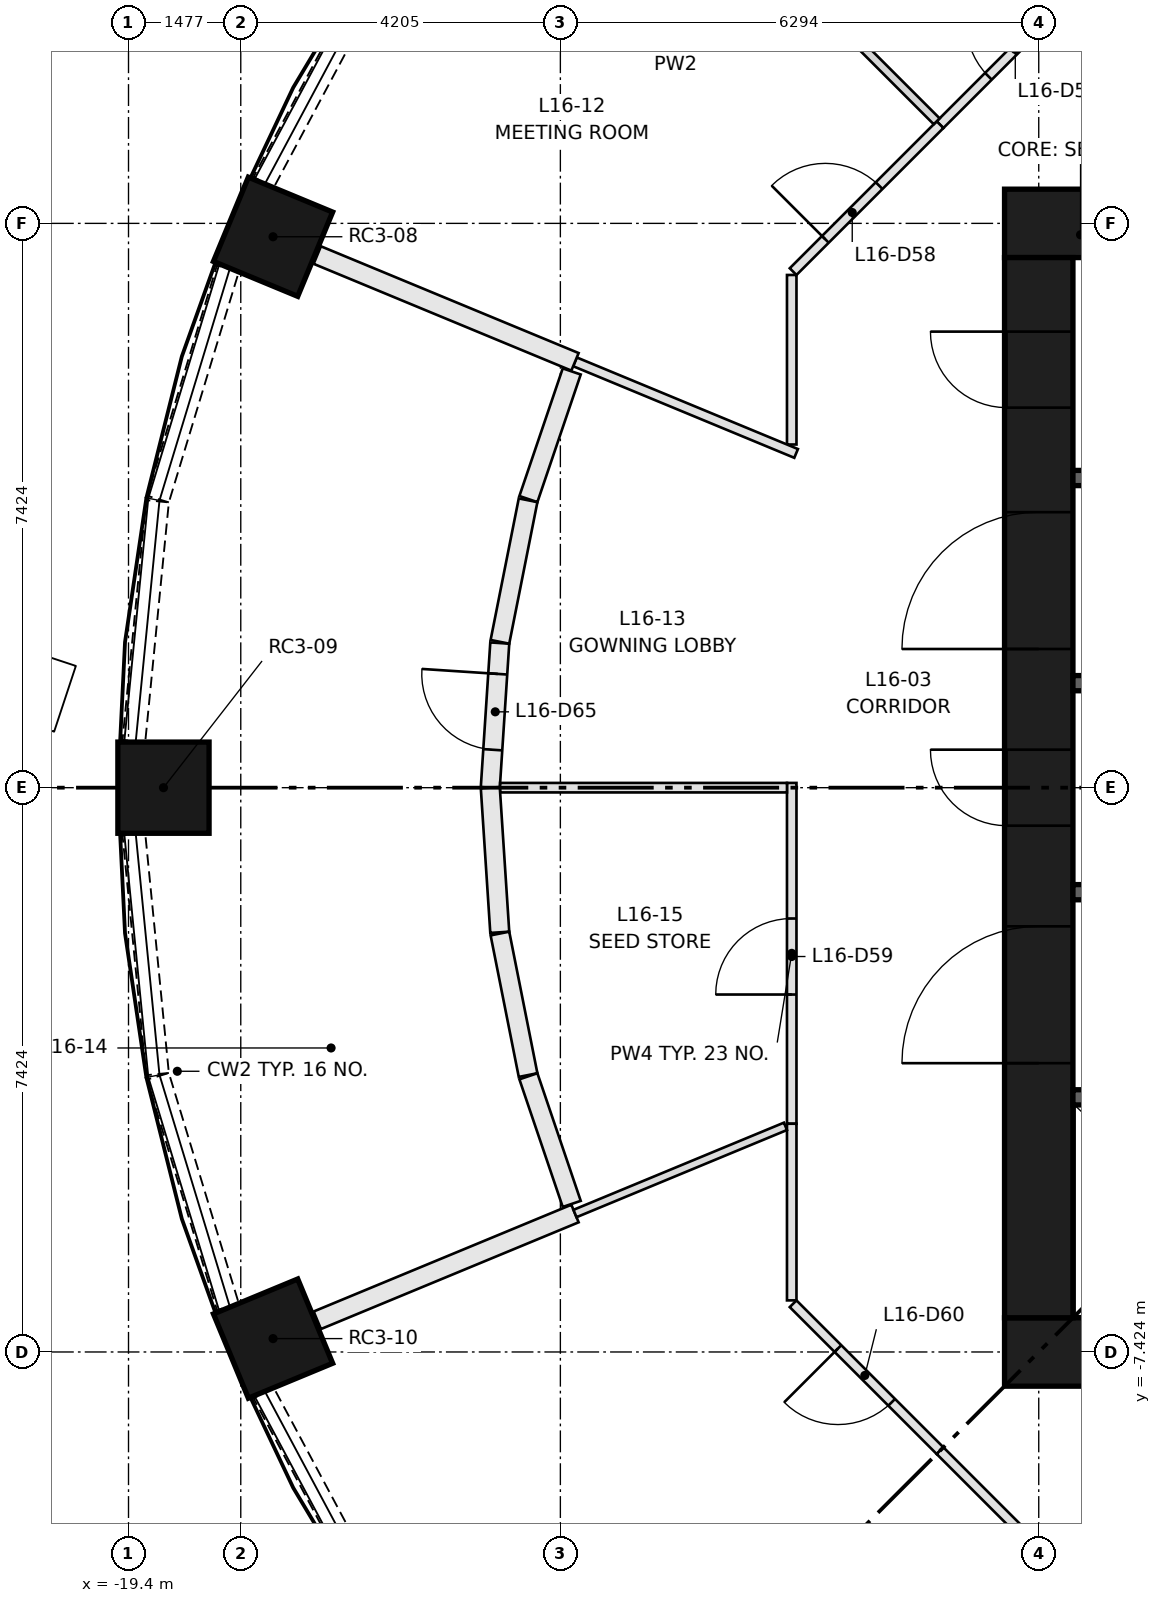
"""IFC4 building model, lengths in metres.
Left out: names, types, materials, properties, quantities, classifications, styles, units other than length and angle.
Written with IfcOpenShell. Run it as: python <this file> out.ifc"""

import sys

from ifc_helpers import new_model, si_unit, direction, frame, frame_2d, origin, origin_2d, place, context, subcontext, project, spatial, rectangle, extrude, element, fill, save


model = new_model("IFC4")
c1 = context("Model", 3, precision=1e-05, world=origin(), true_north=direction((0.0, 1.0)))
c2 = subcontext(c1, "Body", "Model", "MODEL_VIEW")
j1 = project(units=[si_unit("LENGTHUNIT", "METRE"), si_unit("PLANEANGLEUNIT", "RADIAN")], contexts=[c1])
p1 = place(None, origin())
s1 = spatial("IfcSite", under=j1, at=p1, CompositionType="ELEMENT")
p2 = place(p1, origin())
s2 = spatial("IfcBuilding", under=s1, at=p2, CompositionType="ELEMENT")
p3 = place(p2, frame((0.0, 0.0, 62.7)))
s3 = spatial("IfcBuildingStorey", under=s2, at=p3, CompositionType="ELEMENT", Elevation=62.7)
for number, where, z_axis, x_axis in (
    (1, (-17.498, 7.248, 0.0), (0.0, 0.0, 1.0), (-0.924, 0.383, 0.0)),
    (2, (-18.94, 0.0, 0.0), (0.0, 0.0, 1.0), (-1.0, 0.0, 0.0)),
    (3, (-17.498, -7.248, 0.0), (0.0, 0.0, 1.0), (-0.924, -0.383, 0.0)),
):
    element("IfcColumn", number, at=place(p3, frame(where, z_axis=z_axis, x_axis=x_axis)), inside=s3, PredefinedType="COLUMN", context=c2, shape_type="SweptSolid", body=[
        extrude(rectangle(XDim=1.2, YDim=1.2, at=origin_2d()), origin(), (0.0, 0.0, 1.0), 3.65),
    ])
for number, where, z_axis, x_axis in (
    (4, (-7.874, -7.424, 0.0), (0.0, 0.0, 1.0), (1.0, 0.0, 0.0)),
    (5, (-7.874, 7.424, 0.0), (0.0, 0.0, 1.0), (1.0, 0.0, 0.0)),
):
    element("IfcWall", number, at=place(p3, frame(where, z_axis=z_axis, x_axis=x_axis)), inside=s3, PredefinedType="SHEAR", context=c2, shape_type="SweptSolid", body=[
        extrude(rectangle(XDim=15.748, YDim=0.9, at=frame_2d((7.874, 0.0))), origin(), (0.0, 0.0, 1.0), 3.65),
    ])
p4 = place(p3, frame((-7.424, -6.974, 0.0), z_axis=(0.0, 0.0, 1.0), x_axis=(0.0, 1.0, 0.0)))
e6 = element("IfcWall", 6, at=p4, inside=s3, PredefinedType="SHEAR", context=c2, shape_type="SweptSolid", body=[
    extrude(rectangle(XDim=13.948, YDim=0.9, at=frame_2d((6.974, 0.0))), origin(), (0.0, 0.0, 1.0), 3.65),
])
p5 = place(p4, frame((6.474, 0.0, 0.0)))
e7 = element("IfcOpeningElement", 7, at=p5, cuts=e6, PredefinedType="OPENING", context=c2, shape_type="SweptSolid", body=[
    extrude(rectangle(XDim=1.0, YDim=2.1, at=frame_2d((0.5, 1.05))), frame((0.0, 0.46, 0.0), z_axis=(0.0, -1.0, 0.0), x_axis=(1.0, 0.0, 0.0)), (0.0, 0.0, 1.0), 0.92),
])
p6 = place(p4, frame((3.35, 0.0, 0.0)))
e8 = element("IfcOpeningElement", 8, at=p6, cuts=e6, PredefinedType="OPENING", context=c2, shape_type="SweptSolid", body=[
    extrude(rectangle(XDim=1.8, YDim=2.1, at=frame_2d((0.9, 1.05))), frame((0.0, 0.46, 0.0), z_axis=(0.0, -1.0, 0.0), x_axis=(1.0, 0.0, 0.0)), (0.0, 0.0, 1.0), 0.92),
])
p7 = place(p4, frame((8.799, 0.0, 0.0)))
e9 = element("IfcOpeningElement", 9, at=p7, cuts=e6, PredefinedType="OPENING", context=c2, shape_type="SweptSolid", body=[
    extrude(rectangle(XDim=1.8, YDim=2.1, at=frame_2d((0.9, 1.05))), frame((0.0, 0.46, 0.0), z_axis=(0.0, -1.0, 0.0), x_axis=(1.0, 0.0, 0.0)), (0.0, 0.0, 1.0), 0.92),
])
p8 = place(p4, frame((11.974, 0.0, 0.0)))
e10 = element("IfcOpeningElement", 10, at=p8, cuts=e6, PredefinedType="OPENING", context=c2, shape_type="SweptSolid", body=[
    extrude(rectangle(XDim=1.0, YDim=2.1, at=frame_2d((0.5, 1.05))), frame((0.0, 0.46, 0.0), z_axis=(0.0, -1.0, 0.0), x_axis=(1.0, 0.0, 0.0)), (0.0, 0.0, 1.0), 0.92),
])
p9 = place(p3, frame((-6.974, -4.074, 0.0), z_axis=(0.0, 0.0, 1.0), x_axis=(1.0, 0.0, 0.0)))
e11 = element("IfcWall", 11, at=p9, inside=s3, PredefinedType="SHEAR", context=c2, shape_type="SweptSolid", body=[
    extrude(rectangle(XDim=13.948, YDim=0.2, at=frame_2d((6.974, 0.0))), origin(), (0.0, 0.0, 1.0), 3.3),
])
p10 = place(p9, frame((0.918, 0.0, 0.0)))
e12 = element("IfcOpeningElement", 12, at=p10, cuts=e11, PredefinedType="OPENING", context=c2, shape_type="SweptSolid", body=[
    extrude(rectangle(XDim=1.1, YDim=2.1, at=frame_2d((0.55, 1.05))), frame((0.0, 0.11, 0.0), z_axis=(0.0, -1.0, 0.0), x_axis=(1.0, 0.0, 0.0)), (0.0, 0.0, 1.0), 0.22),
])
p11 = place(p9, frame((4.055, 0.0, 0.0)))
e13 = element("IfcOpeningElement", 13, at=p11, cuts=e11, PredefinedType="OPENING", context=c2, shape_type="SweptSolid", body=[
    extrude(rectangle(XDim=1.1, YDim=2.1, at=frame_2d((0.55, 1.05))), frame((0.0, 0.11, 0.0), z_axis=(0.0, -1.0, 0.0), x_axis=(1.0, 0.0, 0.0)), (0.0, 0.0, 1.0), 0.22),
])
p12 = place(p9, frame((6.658, 0.0, 0.0)))
e14 = element("IfcOpeningElement", 14, at=p12, cuts=e11, PredefinedType="OPENING", context=c2, shape_type="SweptSolid", body=[
    extrude(rectangle(XDim=1.0, YDim=2.1, at=frame_2d((0.5, 1.05))), frame((0.0, 0.11, 0.0), z_axis=(0.0, -1.0, 0.0), x_axis=(1.0, 0.0, 0.0)), (0.0, 0.0, 1.0), 0.22),
])
p13 = place(p9, frame((8.627, 0.0, 0.0)))
e15 = element("IfcOpeningElement", 15, at=p13, cuts=e11, PredefinedType="OPENING", context=c2, shape_type="SweptSolid", body=[
    extrude(rectangle(XDim=1.0, YDim=2.1, at=frame_2d((0.5, 1.05))), frame((0.0, 0.11, 0.0), z_axis=(0.0, -1.0, 0.0), x_axis=(1.0, 0.0, 0.0)), (0.0, 0.0, 1.0), 0.22),
])
p14 = place(p9, frame((10.595, 0.0, 0.0)))
e16 = element("IfcOpeningElement", 16, at=p14, cuts=e11, PredefinedType="OPENING", context=c2, shape_type="SweptSolid", body=[
    extrude(rectangle(XDim=1.0, YDim=2.1, at=frame_2d((0.5, 1.05))), frame((0.0, 0.11, 0.0), z_axis=(0.0, -1.0, 0.0), x_axis=(1.0, 0.0, 0.0)), (0.0, 0.0, 1.0), 0.22),
])
p15 = place(p9, frame((12.564, 0.0, 0.0)))
e17 = element("IfcOpeningElement", 17, at=p15, cuts=e11, PredefinedType="OPENING", context=c2, shape_type="SweptSolid", body=[
    extrude(rectangle(XDim=1.0, YDim=2.1, at=frame_2d((0.5, 1.05))), frame((0.0, 0.11, 0.0), z_axis=(0.0, -1.0, 0.0), x_axis=(1.0, 0.0, 0.0)), (0.0, 0.0, 1.0), 0.22),
])
p16 = place(p3, frame((-6.974, 4.074, 0.0), z_axis=(0.0, 0.0, 1.0), x_axis=(1.0, 0.0, 0.0)))
e18 = element("IfcWall", 18, at=p16, inside=s3, PredefinedType="SHEAR", context=c2, shape_type="SweptSolid", body=[
    extrude(rectangle(XDim=6.974, YDim=0.2, at=frame_2d((3.487, 0.0))), origin(), (0.0, 0.0, 1.0), 3.3),
])
for number, where, z_axis, x_axis in (
    (19, (-6.974, -1.375, 0.0), (0.0, 0.0, 1.0), (1.0, 0.0, 0.0)),
    (20, (-6.974, 1.375, 0.0), (0.0, 0.0, 1.0), (1.0, 0.0, 0.0)),
):
    element("IfcWall", number, at=place(p3, frame(where, z_axis=z_axis, x_axis=x_axis)), inside=s3, PredefinedType="SHEAR", context=c2, shape_type="SweptSolid", body=[
        extrude(rectangle(XDim=2.6, YDim=0.2, at=frame_2d((1.3, 0.0))), origin(), (0.0, 0.0, 1.0), 3.3),
    ])
p17 = place(p3, frame((-16.129, 10.759, 0.0), z_axis=(0.0, 0.0, 1.0), x_axis=(-0.47123575379, -0.882007292685, 0.0)))
e21 = element("IfcWall", 21, at=p17, inside=s3, PredefinedType="SOLIDWALL", context=c2, shape_type="SweptSolid", body=[
    extrude(rectangle(XDim=3.17, YDim=0.3, at=frame_2d((1.585, 0.0))), origin(), (0.0, 0.0, 1.0), 0.9),
])
p18 = place(p3, frame((-18.092, 6.83, 0.0), z_axis=(0.0, 0.0, 1.0), x_axis=(-0.290456409527, -0.956888224489, 0.0)))
e22 = element("IfcWall", 22, at=p18, inside=s3, PredefinedType="SOLIDWALL", context=c2, shape_type="SweptSolid", body=[
    extrude(rectangle(XDim=3.169, YDim=0.3, at=frame_2d((1.584, 0.0))), origin(), (0.0, 0.0, 1.0), 0.9),
])
for number, where, z_axis, x_axis in (
    (23, (-19.019, 3.768, 0.0), (0.0, 0.0, 1.0), (-0.098, -0.995, 0.0)),
    (24, (-19.33, -0.613, 0.0), (0.0, 0.0, 1.0), (0.098, -0.995, 0.0)),
):
    element("IfcWall", number, at=place(p3, frame(where, z_axis=z_axis, x_axis=x_axis)), inside=s3, PredefinedType="SOLIDWALL", context=c2, shape_type="SweptSolid", body=[
        extrude(rectangle(XDim=3.171, YDim=0.3, at=frame_2d((1.585, 0.0))), origin(), (0.0, 0.0, 1.0), 0.9),
    ])
p19 = place(p3, frame((-19.013, -3.797, 0.0), z_axis=(0.0, 0.0, 1.0), x_axis=(0.290456409527, -0.956888224489, 0.0)))
e25 = element("IfcWall", 25, at=p19, inside=s3, PredefinedType="SOLIDWALL", context=c2, shape_type="SweptSolid", body=[
    extrude(rectangle(XDim=3.169, YDim=0.3, at=frame_2d((1.584, 0.0))), origin(), (0.0, 0.0, 1.0), 0.9),
])
p20 = place(p3, frame((-17.623, -7.963, 0.0), z_axis=(0.0, 0.0, 1.0), x_axis=(0.47123575379, -0.882007292685, 0.0)))
e26 = element("IfcWall", 26, at=p20, inside=s3, PredefinedType="SOLIDWALL", context=c2, shape_type="SweptSolid", body=[
    extrude(rectangle(XDim=3.17, YDim=0.3, at=frame_2d((1.585, 0.0))), origin(), (0.0, 0.0, 1.0), 0.9),
])
p21 = place(p3, frame((-8.722, 8.722, 0.0), z_axis=(0.0, 0.0, 1.0), x_axis=(0.707062130741, 0.707151428813, 0.0)))
e27 = element("IfcWall", 27, at=p21, inside=s3, PredefinedType="PARTITIONING", context=c2, shape_type="SweptSolid", body=[
    extrude(rectangle(XDim=2.734, YDim=0.125, at=frame_2d((1.367, 0.0))), origin(), (0.0, 0.0, 1.0), 3.3),
])
p22 = place(p21, frame((0.9, 0.0, 0.0)))
e28 = element("IfcOpeningElement", 28, at=p22, cuts=e27, PredefinedType="OPENING", context=c2, shape_type="SweptSolid", body=[
    extrude(rectangle(XDim=1.0, YDim=2.1, at=frame_2d((0.5, 1.05))), frame((0.0, 0.073, 0.0), z_axis=(0.0, -1.0, 0.0), x_axis=(1.0, 0.0, 0.0)), (0.0, 0.0, 1.0), 0.145),
])
p23 = place(p3, frame((-10.674, 4.515, 0.0), z_axis=(0.0, 0.0, 1.0), x_axis=(0.0, 1.0, 0.0)))
e29 = element("IfcWall", 29, at=p23, inside=s3, PredefinedType="PARTITIONING", context=c2, shape_type="SweptSolid", body=[
    extrude(rectangle(XDim=2.23, YDim=0.125, at=frame_2d((1.115, 0.0))), origin(), (0.0, 0.0, 1.0), 3.3),
])
p24 = place(p3, frame((-10.656, 6.789, 0.0), z_axis=(0.0, 0.0, 1.0), x_axis=(0.707151428813, 0.707062130741, 0.0)))
e30 = element("IfcWall", 30, at=p24, inside=s3, PredefinedType="PARTITIONING", context=c2, shape_type="SweptSolid", body=[
    extrude(rectangle(XDim=2.734, YDim=0.125, at=frame_2d((1.367, 0.0))), origin(), (0.0, 0.0, 1.0), 3.3),
])
p25 = place(p24, frame((0.6, 0.0, 0.0)))
e31 = element("IfcOpeningElement", 31, at=p25, cuts=e30, PredefinedType="OPENING", context=c2, shape_type="SweptSolid", body=[
    extrude(rectangle(XDim=1.0, YDim=2.1, at=frame_2d((0.5, 1.05))), frame((0.0, 0.073, 0.0), z_axis=(0.0, -1.0, 0.0), x_axis=(1.0, 0.0, 0.0)), (0.0, 0.0, 1.0), 0.145),
])
p26 = place(p3, frame((-10.674, -4.421, 0.0), z_axis=(0.0, 0.0, 1.0), x_axis=(0.0, 1.0, 0.0)))
e32 = element("IfcWall", 32, at=p26, inside=s3, PredefinedType="PARTITIONING", context=c2, shape_type="SweptSolid", body=[
    extrude(rectangle(XDim=4.484, YDim=0.125, at=frame_2d((2.242, 0.0))), origin(), (0.0, 0.0, 1.0), 3.3),
])
p27 = place(p26, frame((1.7, 0.0, 0.0)))
e33 = element("IfcOpeningElement", 33, at=p27, cuts=e32, PredefinedType="OPENING", context=c2, shape_type="SweptSolid", body=[
    extrude(rectangle(XDim=1.0, YDim=2.1, at=frame_2d((0.5, 1.05))), frame((0.0, 0.073, 0.0), z_axis=(0.0, -1.0, 0.0), x_axis=(1.0, 0.0, 0.0)), (0.0, 0.0, 1.0), 0.145),
])
p28 = place(p3, frame((-10.674, -6.745, 0.0), z_axis=(0.0, 0.0, 1.0), x_axis=(0.0, 1.0, 0.0)))
e34 = element("IfcWall", 34, at=p28, inside=s3, PredefinedType="PARTITIONING", context=c2, shape_type="SweptSolid", body=[
    extrude(rectangle(XDim=2.324, YDim=0.125, at=frame_2d((1.162, 0.0))), origin(), (0.0, 0.0, 1.0), 3.3),
])
p29 = place(p3, frame((-8.722, -8.722, 0.0), z_axis=(0.0, 0.0, 1.0), x_axis=(-0.707151428813, 0.707062130741, 0.0)))
e35 = element("IfcWall", 35, at=p29, inside=s3, PredefinedType="PARTITIONING", context=c2, shape_type="SweptSolid", body=[
    extrude(rectangle(XDim=2.734, YDim=0.125, at=frame_2d((1.367, 0.0))), origin(), (0.0, 0.0, 1.0), 3.3),
])
p30 = place(p29, frame((0.9, 0.0, 0.0)))
e36 = element("IfcOpeningElement", 36, at=p30, cuts=e35, PredefinedType="OPENING", context=c2, shape_type="SweptSolid", body=[
    extrude(rectangle(XDim=1.0, YDim=2.1, at=frame_2d((0.5, 1.05))), frame((0.0, 0.073, 0.0), z_axis=(0.0, -1.0, 0.0), x_axis=(1.0, 0.0, 0.0)), (0.0, 0.0, 1.0), 0.145),
])
p31 = place(p3, frame((-6.789, -10.656, 0.0), z_axis=(0.0, 0.0, 1.0), x_axis=(-0.707062130741, 0.707151428813, 0.0)))
e37 = element("IfcWall", 37, at=p31, inside=s3, PredefinedType="PARTITIONING", context=c2, shape_type="SweptSolid", body=[
    extrude(rectangle(XDim=2.734, YDim=0.125, at=frame_2d((1.367, 0.0))), origin(), (0.0, 0.0, 1.0), 3.3),
])
p32 = place(p3, frame((-8.767, 8.767, 0.0), z_axis=(0.0, 0.0, 1.0), x_axis=(-0.707106781187, 0.707106781187, 0.0)))
e38 = element("IfcWall", 38, at=p32, inside=s3, PredefinedType="PARTITIONING", context=c2, shape_type="SweptSolid", body=[
    extrude(rectangle(XDim=5.912, YDim=0.11, at=frame_2d((2.956, 0.0))), origin(), (0.0, 0.0, 1.0), 3.3),
])
p33 = place(p3, frame((-10.616, 4.397, 0.0), z_axis=(0.0, 0.0, 1.0), x_axis=(-0.923884549049, 0.382671321147, 0.0)))
e39 = element("IfcWall", 39, at=p33, inside=s3, PredefinedType="PARTITIONING", context=c2, shape_type="SweptSolid", body=[
    extrude(rectangle(XDim=3.149, YDim=0.125, at=frame_2d((1.575, 0.0))), origin(), (0.0, 0.0, 1.0), 3.3),
])
p34 = place(p3, frame((-13.526, 5.603, 0.0), z_axis=(0.0, 0.0, 1.0), x_axis=(-0.923870076355, 0.382706260748, 0.0)))
e40 = element("IfcWall", 40, at=p34, inside=s3, PredefinedType="PARTITIONING", context=c2, shape_type="SweptSolid", body=[
    extrude(rectangle(XDim=3.67, YDim=0.25, at=frame_2d((1.835, 0.0))), origin(), (0.0, 0.0, 1.0), 3.3),
])
p35 = place(p3, frame((-14.64, 0.0, 0.0), z_axis=(0.0, 0.0, 1.0), x_axis=(0.065303653727, 0.997865438228, 0.0)))
e41 = element("IfcWall", 41, at=p35, inside=s3, PredefinedType="PARTITIONING", context=c2, shape_type="SweptSolid", body=[
    extrude(rectangle(XDim=1.907, YDim=0.25, at=frame_2d((0.953, 0.0))), origin(), (0.0, 0.0, 1.0), 3.3),
])
p36 = place(p35, frame((0.5, 0.0, 0.0)))
e42 = element("IfcOpeningElement", 42, at=p36, cuts=e41, PredefinedType="OPENING", context=c2, shape_type="SweptSolid", body=[
    extrude(rectangle(XDim=1.0, YDim=2.1, at=frame_2d((0.5, 1.05))), frame((0.0, 0.135, 0.0), z_axis=(0.0, -1.0, 0.0), x_axis=(1.0, 0.0, 0.0)), (0.0, 0.0, 1.0), 0.27),
])
p37 = place(p3, frame((-14.513, 1.919, 0.0), z_axis=(0.0, 0.0, 1.0), x_axis=(0.195077379777, 0.980787854686, 0.0)))
e43 = element("IfcWall", 43, at=p37, inside=s3, PredefinedType="PARTITIONING", context=c2, shape_type="SweptSolid", body=[
    extrude(rectangle(XDim=1.898, YDim=0.25, at=frame_2d((0.949, 0.0))), origin(), (0.0, 0.0, 1.0), 3.3),
])
p38 = place(p3, frame((-14.139, 3.797, 0.0), z_axis=(0.0, 0.0, 1.0), x_axis=(0.321468303742, 0.946920339674, 0.0)))
e44 = element("IfcWall", 44, at=p38, inside=s3, PredefinedType="PARTITIONING", context=c2, shape_type="SweptSolid", body=[
    extrude(rectangle(XDim=1.773, YDim=0.25, at=frame_2d((0.887, 0.0))), origin(), (0.0, 0.0, 1.0), 3.3),
])
p39 = place(p3, frame((-10.737, 0.0, 0.0), z_axis=(0.0, 0.0, 1.0), x_axis=(-1.0, 0.0, 0.0)))
e45 = element("IfcWall", 45, at=p39, inside=s3, PredefinedType="PARTITIONING", context=c2, shape_type="SweptSolid", body=[
    extrude(rectangle(XDim=3.774, YDim=0.125, at=frame_2d((1.887, 0.0))), origin(), (0.0, 0.0, 1.0), 3.3),
])
p40 = place(p3, frame((-14.64, 0.0, 0.0), z_axis=(0.0, 0.0, 1.0), x_axis=(0.065303653727, -0.997865438228, 0.0)))
e46 = element("IfcWall", 46, at=p40, inside=s3, PredefinedType="PARTITIONING", context=c2, shape_type="SweptSolid", body=[
    extrude(rectangle(XDim=1.907, YDim=0.25, at=frame_2d((0.953, 0.0))), origin(), (0.0, 0.0, 1.0), 3.3),
])
p41 = place(p3, frame((-14.513, -1.919, 0.0), z_axis=(0.0, 0.0, 1.0), x_axis=(0.195077379777, -0.980787854686, 0.0)))
e47 = element("IfcWall", 47, at=p41, inside=s3, PredefinedType="PARTITIONING", context=c2, shape_type="SweptSolid", body=[
    extrude(rectangle(XDim=1.898, YDim=0.25, at=frame_2d((0.949, 0.0))), origin(), (0.0, 0.0, 1.0), 3.3),
])
p42 = place(p3, frame((-14.139, -3.797, 0.0), z_axis=(0.0, 0.0, 1.0), x_axis=(0.321468303742, -0.946920339674, 0.0)))
e48 = element("IfcWall", 48, at=p42, inside=s3, PredefinedType="PARTITIONING", context=c2, shape_type="SweptSolid", body=[
    extrude(rectangle(XDim=1.773, YDim=0.25, at=frame_2d((0.887, 0.0))), origin(), (0.0, 0.0, 1.0), 3.3),
])
p43 = place(p3, frame((-13.526, -5.603, 0.0), z_axis=(0.0, 0.0, 1.0), x_axis=(-0.923870076355, -0.382706260748, 0.0)))
e49 = element("IfcWall", 49, at=p43, inside=s3, PredefinedType="PARTITIONING", context=c2, shape_type="SweptSolid", body=[
    extrude(rectangle(XDim=3.67, YDim=0.25, at=frame_2d((1.835, 0.0))), origin(), (0.0, 0.0, 1.0), 3.3),
])
p44 = place(p3, frame((-10.757, -4.456, 0.0), z_axis=(0.0, 0.0, 1.0), x_axis=(-0.923879826967, -0.382682721486, 0.0)))
e50 = element("IfcWall", 50, at=p44, inside=s3, PredefinedType="PARTITIONING", context=c2, shape_type="SweptSolid", body=[
    extrude(rectangle(XDim=2.997, YDim=0.105, at=frame_2d((1.499, 0.0))), origin(), (0.0, 0.0, 1.0), 3.3),
])
p45 = place(p5, origin())
e51 = element("IfcDoor", 51, at=p45, inside=s3, OperationType="SINGLE_SWING_RIGHT", PredefinedType="DOOR", context=c2, shape_type="SweptSolid", body=[
    extrude(rectangle(XDim=1.0, YDim=2.1, at=frame_2d((0.5, 1.05))), frame((0.0, 0.45, 0.0), z_axis=(0.0, -1.0, 0.0), x_axis=(1.0, 0.0, 0.0)), (0.0, 0.0, 1.0), 0.05),
])
fill(e7, e51)
p46 = place(p6, origin())
e52 = element("IfcDoor", 52, at=p46, inside=s3, OperationType="DOUBLE_DOOR_SINGLE_SWING", PredefinedType="DOOR", context=c2, shape_type="SweptSolid", body=[
    extrude(rectangle(XDim=1.8, YDim=2.1, at=frame_2d((0.9, 1.05))), frame((0.0, 0.025, 0.0), z_axis=(0.0, -1.0, 0.0), x_axis=(1.0, 0.0, 0.0)), (0.0, 0.0, 1.0), 0.05),
])
fill(e8, e52)
p47 = place(p7, origin())
e53 = element("IfcDoor", 53, at=p47, inside=s3, OperationType="DOUBLE_DOOR_SINGLE_SWING", PredefinedType="DOOR", context=c2, shape_type="SweptSolid", body=[
    extrude(rectangle(XDim=1.8, YDim=2.1, at=frame_2d((0.9, 1.05))), frame((0.0, 0.025, 0.0), z_axis=(0.0, -1.0, 0.0), x_axis=(1.0, 0.0, 0.0)), (0.0, 0.0, 1.0), 0.05),
])
fill(e9, e53)
p48 = place(p8, origin())
e54 = element("IfcDoor", 54, at=p48, inside=s3, OperationType="SINGLE_SWING_RIGHT", PredefinedType="DOOR", context=c2, shape_type="SweptSolid", body=[
    extrude(rectangle(XDim=1.0, YDim=2.1, at=frame_2d((0.5, 1.05))), frame((0.0, 0.45, 0.0), z_axis=(0.0, -1.0, 0.0), x_axis=(1.0, 0.0, 0.0)), (0.0, 0.0, 1.0), 0.05),
])
fill(e10, e54)
p49 = place(p22, origin())
e55 = element("IfcDoor", 55, at=p49, inside=s3, OperationType="SINGLE_SWING_RIGHT", PredefinedType="DOOR", context=c2, shape_type="SweptSolid", body=[
    extrude(rectangle(XDim=1.0, YDim=2.1, at=frame_2d((0.5, 1.05))), frame((0.0, 0.025, 0.0), z_axis=(0.0, -1.0, 0.0), x_axis=(1.0, 0.0, 0.0)), (0.0, 0.0, 1.0), 0.05),
])
fill(e28, e55)
p50 = place(p25, origin())
e56 = element("IfcDoor", 56, at=p50, inside=s3, OperationType="SINGLE_SWING_LEFT", PredefinedType="DOOR", context=c2, shape_type="SweptSolid", body=[
    extrude(rectangle(XDim=1.0, YDim=2.1, at=frame_2d((0.5, 1.05))), frame((0.0, 0.025, 0.0), z_axis=(0.0, -1.0, 0.0), x_axis=(1.0, 0.0, 0.0)), (0.0, 0.0, 1.0), 0.05),
])
fill(e31, e56)
p51 = place(p27, origin())
e57 = element("IfcDoor", 57, at=p51, inside=s3, OperationType="SINGLE_SWING_LEFT", PredefinedType="DOOR", context=c2, shape_type="SweptSolid", body=[
    extrude(rectangle(XDim=1.0, YDim=2.1, at=frame_2d((0.5, 1.05))), frame((0.0, 0.025, 0.0), z_axis=(0.0, -1.0, 0.0), x_axis=(1.0, 0.0, 0.0)), (0.0, 0.0, 1.0), 0.05),
])
fill(e33, e57)
p52 = place(p30, origin())
e58 = element("IfcDoor", 58, at=p52, inside=s3, OperationType="SINGLE_SWING_RIGHT", PredefinedType="DOOR", context=c2, shape_type="SweptSolid", body=[
    extrude(rectangle(XDim=1.0, YDim=2.1, at=frame_2d((0.5, 1.05))), frame((0.0, 0.025, 0.0), z_axis=(0.0, -1.0, 0.0), x_axis=(1.0, 0.0, 0.0)), (0.0, 0.0, 1.0), 0.05),
])
fill(e36, e58)
p53 = place(p36, origin())
e59 = element("IfcDoor", 59, at=p53, inside=s3, OperationType="SINGLE_SWING_RIGHT", PredefinedType="DOOR", context=c2, shape_type="SweptSolid", body=[
    extrude(rectangle(XDim=1.0, YDim=2.1, at=frame_2d((0.5, 1.05))), frame((0.0, 0.025, 0.0), z_axis=(0.0, -1.0, 0.0), x_axis=(1.0, 0.0, 0.0)), (0.0, 0.0, 1.0), 0.05),
])
fill(e42, e59)
save(model, sys.argv[1])
